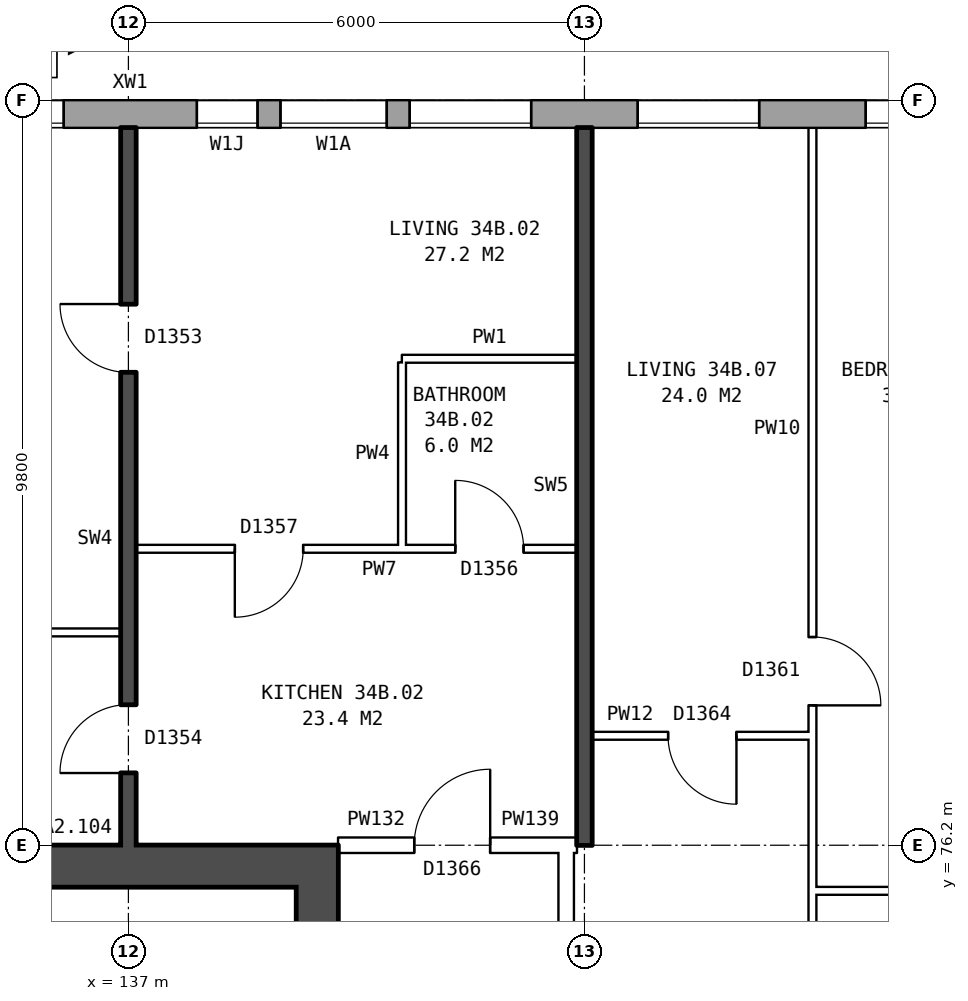
"""IFC4 building model, lengths in metres.
Left out: names, types, materials, properties, quantities, classifications, styles, units other than length and angle.
Written with IfcOpenShell. Run it as: python <this file> out.ifc"""

import sys

from ifc_helpers import new_model, si_unit, direction, frame, frame_2d, origin, place, context, subcontext, project, spatial, rectangle, extrude, element, fill, save


model = new_model("IFC4")
c1 = context("Model", 3, precision=1e-05, world=origin(), true_north=direction((0.0, 1.0)))
c2 = subcontext(c1, "Body", "Model", "MODEL_VIEW")
j1 = project(units=[si_unit("LENGTHUNIT", "METRE"), si_unit("PLANEANGLEUNIT", "RADIAN")], contexts=[c1])
p1 = place(None, origin())
s1 = spatial("IfcSite", under=j1, at=p1, CompositionType="ELEMENT")
p2 = place(p1, origin())
s2 = spatial("IfcBuilding", under=s1, at=p2, CompositionType="ELEMENT")
p3 = place(p2, frame((0.0, 0.0, 123.7)))
s3 = spatial("IfcBuildingStorey", under=s2, at=p3, CompositionType="ELEMENT", Elevation=123.7)
p4 = place(p3, frame((169.675, 85.82, 0.0), z_axis=(0.0, 0.0, 1.0), x_axis=(-1.0, 0.0, 0.0)))
e1 = element("IfcWall", 1, at=p4, inside=s3, PredefinedType="STANDARD", context=c2, shape_type="SweptSolid", body=[
    extrude(rectangle(XDim=35.601, YDim=0.36, at=frame_2d((17.8, 0.0))), origin(), (0.0, 0.0, 1.0), 2.85),
])
p5 = place(p4, frame((0.3, 0.0, 0.8)))
e2 = element("IfcOpeningElement", 2, at=p5, cuts=e1, PredefinedType="OPENING", context=c2, shape_type="SweptSolid", body=[
    extrude(rectangle(XDim=0.8, YDim=1.8, at=frame_2d((0.4, 0.9))), frame((0.0, 0.19, 0.0), z_axis=(0.0, -1.0, 0.0), x_axis=(1.0, 0.0, 0.0)), (0.0, 0.0, 1.0), 0.38),
])
p6 = place(p4, frame((3.125, 0.0, 0.8)))
e3 = element("IfcOpeningElement", 3, at=p6, cuts=e1, PredefinedType="OPENING", context=c2, shape_type="SweptSolid", body=[
    extrude(rectangle(XDim=0.8, YDim=0.9, at=frame_2d((0.4, 0.45))), frame((0.0, 0.19, 0.0), z_axis=(0.0, -1.0, 0.0), x_axis=(1.0, 0.0, 0.0)), (0.0, 0.0, 1.0), 0.38),
])
p7 = place(p4, frame((6.375, 0.0, 0.8)))
e4 = element("IfcOpeningElement", 4, at=p7, cuts=e1, PredefinedType="OPENING", context=c2, shape_type="SweptSolid", body=[
    extrude(rectangle(XDim=1.6, YDim=1.8, at=frame_2d((0.8, 0.9))), frame((0.0, 0.19, 0.0), z_axis=(0.0, -1.0, 0.0), x_axis=(1.0, 0.0, 0.0)), (0.0, 0.0, 1.0), 0.38),
])
p8 = place(p4, frame((9.375, 0.0, 0.8)))
e5 = element("IfcOpeningElement", 5, at=p8, cuts=e1, PredefinedType="OPENING", context=c2, shape_type="SweptSolid", body=[
    extrude(rectangle(XDim=1.6, YDim=1.8, at=frame_2d((0.8, 0.9))), frame((0.0, 0.19, 0.0), z_axis=(0.0, -1.0, 0.0), x_axis=(1.0, 0.0, 0.0)), (0.0, 0.0, 1.0), 0.38),
])
p9 = place(p4, frame((12.375, 0.0, 0.8)))
e6 = element("IfcOpeningElement", 6, at=p9, cuts=e1, PredefinedType="OPENING", context=c2, shape_type="SweptSolid", body=[
    extrude(rectangle(XDim=1.6, YDim=1.8, at=frame_2d((0.8, 0.9))), frame((0.0, 0.19, 0.0), z_axis=(0.0, -1.0, 0.0), x_axis=(1.0, 0.0, 0.0)), (0.0, 0.0, 1.0), 0.38),
])
p10 = place(p4, frame((15.375, 0.0, 0.8)))
e7 = element("IfcOpeningElement", 7, at=p10, cuts=e1, PredefinedType="OPENING", context=c2, shape_type="SweptSolid", body=[
    extrude(rectangle(XDim=1.6, YDim=1.8, at=frame_2d((0.8, 0.9))), frame((0.0, 0.19, 0.0), z_axis=(0.0, -1.0, 0.0), x_axis=(1.0, 0.0, 0.0)), (0.0, 0.0, 1.0), 0.38),
])
p11 = place(p4, frame((18.375, 0.0, 0.8)))
e8 = element("IfcOpeningElement", 8, at=p11, cuts=e1, PredefinedType="OPENING", context=c2, shape_type="SweptSolid", body=[
    extrude(rectangle(XDim=1.6, YDim=1.8, at=frame_2d((0.8, 0.9))), frame((0.0, 0.19, 0.0), z_axis=(0.0, -1.0, 0.0), x_axis=(1.0, 0.0, 0.0)), (0.0, 0.0, 1.0), 0.38),
])
p12 = place(p4, frame((21.375, 0.0, 0.8)))
e9 = element("IfcOpeningElement", 9, at=p12, cuts=e1, PredefinedType="OPENING", context=c2, shape_type="SweptSolid", body=[
    extrude(rectangle(XDim=1.6, YDim=1.8, at=frame_2d((0.8, 0.9))), frame((0.0, 0.19, 0.0), z_axis=(0.0, -1.0, 0.0), x_axis=(1.0, 0.0, 0.0)), (0.0, 0.0, 1.0), 0.38),
])
p13 = place(p4, frame((24.375, 0.0, 0.8)))
e10 = element("IfcOpeningElement", 10, at=p13, cuts=e1, PredefinedType="OPENING", context=c2, shape_type="SweptSolid", body=[
    extrude(rectangle(XDim=1.6, YDim=1.8, at=frame_2d((0.8, 0.9))), frame((0.0, 0.19, 0.0), z_axis=(0.0, -1.0, 0.0), x_axis=(1.0, 0.0, 0.0)), (0.0, 0.0, 1.0), 0.38),
])
p14 = place(p4, frame((27.375, 0.0, 0.8)))
e11 = element("IfcOpeningElement", 11, at=p14, cuts=e1, PredefinedType="OPENING", context=c2, shape_type="SweptSolid", body=[
    extrude(rectangle(XDim=1.6, YDim=1.8, at=frame_2d((0.8, 0.9))), frame((0.0, 0.19, 0.0), z_axis=(0.0, -1.0, 0.0), x_axis=(1.0, 0.0, 0.0)), (0.0, 0.0, 1.0), 0.38),
])
p15 = place(p4, frame((29.275, 0.0, 0.8)))
e12 = element("IfcOpeningElement", 12, at=p15, cuts=e1, PredefinedType="OPENING", context=c2, shape_type="SweptSolid", body=[
    extrude(rectangle(XDim=1.4, YDim=1.8, at=frame_2d((0.7, 0.9))), frame((0.0, 0.19, 0.0), z_axis=(0.0, -1.0, 0.0), x_axis=(1.0, 0.0, 0.0)), (0.0, 0.0, 1.0), 0.38),
])
p16 = place(p4, frame((33.525, 0.0, 1.7)))
e13 = element("IfcOpeningElement", 13, at=p16, cuts=e1, PredefinedType="OPENING", context=c2, shape_type="SweptSolid", body=[
    extrude(rectangle(XDim=0.6, YDim=0.9, at=frame_2d((0.3, 0.45))), frame((0.0, 0.19, 0.0), z_axis=(0.0, -1.0, 0.0), x_axis=(1.0, 0.0, 0.0)), (0.0, 0.0, 1.0), 0.38),
])
p17 = place(p4, frame((1.4, 0.0, 1.6)))
e14 = element("IfcOpeningElement", 14, at=p17, cuts=e1, PredefinedType="OPENING", context=c2, shape_type="SweptSolid", body=[
    extrude(rectangle(XDim=0.6, YDim=0.9, at=frame_2d((0.3, 0.45))), frame((0.0, 0.19, 0.0), z_axis=(0.0, -1.0, 0.0), x_axis=(1.0, 0.0, 0.0)), (0.0, 0.0, 1.0), 0.38),
])
p18 = place(p4, frame((4.225, 0.0, 0.8)))
e15 = element("IfcOpeningElement", 15, at=p18, cuts=e1, PredefinedType="OPENING", context=c2, shape_type="SweptSolid", body=[
    extrude(rectangle(XDim=1.6, YDim=1.8, at=frame_2d((0.8, 0.9))), frame((0.0, 0.19, 0.0), z_axis=(0.0, -1.0, 0.0), x_axis=(1.0, 0.0, 0.0)), (0.0, 0.0, 1.0), 0.38),
])
p19 = place(p4, frame((30.975, 0.0, 0.8)))
e16 = element("IfcOpeningElement", 16, at=p19, cuts=e1, PredefinedType="OPENING", context=c2, shape_type="SweptSolid", body=[
    extrude(rectangle(XDim=0.8, YDim=1.5, at=frame_2d((0.4, 0.75))), frame((0.0, 0.19, 0.0), z_axis=(0.0, -1.0, 0.0), x_axis=(1.0, 0.0, 0.0)), (0.0, 0.0, 1.0), 0.38),
])
p20 = place(p4, frame((34.425, 0.0, 0.8)))
e17 = element("IfcOpeningElement", 17, at=p20, cuts=e1, PredefinedType="OPENING", context=c2, shape_type="SweptSolid", body=[
    extrude(rectangle(XDim=0.8, YDim=1.8, at=frame_2d((0.4, 0.9))), frame((0.0, 0.19, 0.0), z_axis=(0.0, -1.0, 0.0), x_axis=(1.0, 0.0, 0.0)), (0.0, 0.0, 1.0), 0.38),
])
p21 = place(p3, frame((139.485, 63.8, 0.0), z_axis=(0.0, 0.0, 1.0), x_axis=(0.0, 1.0, 0.0)))
e18 = element("IfcWall", 18, at=p21, inside=s3, PredefinedType="SHEAR", context=c2, shape_type="SweptSolid", body=[
    extrude(rectangle(XDim=12.4, YDim=0.55, at=frame_2d((6.2, 0.0))), origin(), (0.0, 0.0, 1.0), 2.85),
])
p22 = place(p21, frame((1.325, 0.0, 0.0)))
e19 = element("IfcOpeningElement", 19, at=p22, cuts=e18, PredefinedType="OPENING", context=c2, shape_type="SweptSolid", body=[
    extrude(rectangle(XDim=1.1, YDim=2.1, at=frame_2d((0.55, 1.05))), frame((0.0, 0.285, 0.0), z_axis=(0.0, -1.0, 0.0), x_axis=(1.0, 0.0, 0.0)), (0.0, 0.0, 1.0), 0.57),
])
p23 = place(p21, frame((3.6, 0.0, 0.0)))
e20 = element("IfcOpeningElement", 20, at=p23, cuts=e18, PredefinedType="OPENING", context=c2, shape_type="SweptSolid", body=[
    extrude(rectangle(XDim=1.1, YDim=2.1, at=frame_2d((0.55, 1.05))), frame((0.0, 0.285, 0.0), z_axis=(0.0, -1.0, 0.0), x_axis=(1.0, 0.0, 0.0)), (0.0, 0.0, 1.0), 0.57),
])
p24 = place(p21, frame((5.8, 0.0, 0.0)))
e21 = element("IfcOpeningElement", 21, at=p24, cuts=e18, PredefinedType="OPENING", context=c2, shape_type="SweptSolid", body=[
    extrude(rectangle(XDim=1.1, YDim=2.1, at=frame_2d((0.55, 1.05))), frame((0.0, 0.285, 0.0), z_axis=(0.0, -1.0, 0.0), x_axis=(1.0, 0.0, 0.0)), (0.0, 0.0, 1.0), 0.57),
])
p25 = place(p21, frame((9.9, 0.0, 0.0)))
e22 = element("IfcOpeningElement", 22, at=p25, cuts=e18, PredefinedType="OPENING", context=c2, shape_type="SweptSolid", body=[
    extrude(rectangle(XDim=1.1, YDim=2.1, at=frame_2d((0.55, 1.05))), frame((0.0, 0.285, 0.0), z_axis=(0.0, -1.0, 0.0), x_axis=(1.0, 0.0, 0.0)), (0.0, 0.0, 1.0), 0.57),
])
p26 = place(p21, frame((8.125, 0.0, 0.0)))
e23 = element("IfcOpeningElement", 23, at=p26, cuts=e18, PredefinedType="OPENING", context=c2, shape_type="SweptSolid", body=[
    extrude(rectangle(XDim=0.85, YDim=2.1, at=frame_2d((0.425, 1.05))), frame((0.0, 0.285, 0.0), z_axis=(0.0, -1.0, 0.0), x_axis=(1.0, 0.0, 0.0)), (0.0, 0.0, 1.0), 0.57),
])
p27 = place(p3, frame((139.21, 75.925, 0.0), z_axis=(0.0, 0.0, 1.0), x_axis=(-1.0, 0.0, 0.0)))
e24 = element("IfcWall", 24, at=p27, inside=s3, PredefinedType="SHEAR", context=c2, shape_type="SweptSolid", body=[
    extrude(rectangle(XDim=7.3, YDim=0.55, at=frame_2d((3.65, 0.0))), origin(), (0.0, 0.0, 1.0), 2.85),
])
p28 = place(p3, frame((142.76, 63.9, 0.0), z_axis=(0.0, 0.0, 1.0), x_axis=(0.0, 1.0, 0.0)))
e25 = element("IfcWall", 25, at=p28, inside=s3, PredefinedType="PARTITIONING", context=c2, shape_type="SweptSolid", body=[
    extrude(rectangle(XDim=12.2, YDim=0.2, at=frame_2d((6.1, 0.0))), origin(), (0.0, 0.0, 1.0), 2.85),
])
p29 = place(p28, frame((5.1, 0.0, 0.0)))
e26 = element("IfcOpeningElement", 26, at=p29, cuts=e25, PredefinedType="OPENING", context=c2, shape_type="SweptSolid", body=[
    extrude(rectangle(XDim=2.0, YDim=2.1, at=frame_2d((1.0, 1.05))), frame((0.0, 0.11, 0.0), z_axis=(0.0, -1.0, 0.0), x_axis=(1.0, 0.0, 0.0)), (0.0, 0.0, 1.0), 0.22),
])
p30 = place(p3, frame((146.0, 75.6, 0.0), z_axis=(0.0, 0.0, 1.0), x_axis=(1.0, 0.0, 0.0)))
e27 = element("IfcWall", 27, at=p30, inside=s3, PredefinedType="PARTITIONING", context=c2, shape_type="SweptSolid", body=[
    extrude(rectangle(XDim=6.0, YDim=0.1, at=frame_2d((3.0, 0.0))), origin(), (0.0, 0.0, 1.0), 2.85),
])
p31 = place(p3, frame((139.76, 76.2, 0.0), z_axis=(0.0, 0.0, 1.0), x_axis=(1.0, 0.0, 0.0)))
e28 = element("IfcWall", 28, at=p31, inside=s3, PredefinedType="PARTITIONING", context=c2, shape_type="SweptSolid", body=[
    extrude(rectangle(XDim=3.0, YDim=0.2, at=frame_2d((1.5, 0.0))), origin(), (0.0, 0.0, 1.0), 2.85),
])
p32 = place(p31, frame((1.0, 0.0, 0.0)))
e29 = element("IfcOpeningElement", 29, at=p32, cuts=e28, PredefinedType="OPENING", context=c2, shape_type="SweptSolid", body=[
    extrude(rectangle(XDim=1.0, YDim=2.1, at=frame_2d((0.5, 1.05))), frame((0.0, 0.11, 0.0), z_axis=(0.0, -1.0, 0.0), x_axis=(1.0, 0.0, 0.0)), (0.0, 0.0, 1.0), 0.22),
])
p33 = place(p3, frame((142.76, 76.2, 0.0), z_axis=(0.0, 0.0, 1.0), x_axis=(1.0, 0.0, 0.0)))
e30 = element("IfcWall", 30, at=p33, inside=s3, PredefinedType="PARTITIONING", context=c2, shape_type="SweptSolid", body=[
    extrude(rectangle(XDim=0.14, YDim=0.2, at=frame_2d((0.07, 0.0))), origin(), (0.0, 0.0, 1.0), 2.85),
])
p34 = place(p3, frame((143.1, 77.64, 0.0), z_axis=(0.0, 0.0, 1.0), x_axis=(1.0, 0.0, 0.0)))
e31 = element("IfcWall", 31, at=p34, inside=s3, PredefinedType="PARTITIONING", context=c2, shape_type="SweptSolid", body=[
    extrude(rectangle(XDim=2.9, YDim=0.1, at=frame_2d((1.45, 0.0))), origin(), (0.0, 0.0, 1.0), 2.85),
])
p35 = place(p34, frame((1.0, 0.0, 0.0)))
e32 = element("IfcOpeningElement", 32, at=p35, cuts=e31, PredefinedType="OPENING", context=c2, shape_type="SweptSolid", body=[
    extrude(rectangle(XDim=0.9, YDim=2.1, at=frame_2d((0.45, 1.05))), frame((0.0, 0.06, 0.0), z_axis=(0.0, -1.0, 0.0), x_axis=(1.0, 0.0, 0.0)), (0.0, 0.0, 1.0), 0.12),
])
p36 = place(p3, frame((131.36, 79.0, 0.0), z_axis=(0.0, 0.0, 1.0), x_axis=(1.0, 0.0, 0.0)))
e33 = element("IfcWall", 33, at=p36, inside=s3, PredefinedType="PARTITIONING", context=c2, shape_type="SweptSolid", body=[
    extrude(rectangle(XDim=5.54, YDim=0.1, at=frame_2d((2.77, 0.0))), origin(), (0.0, 0.0, 1.0), 2.85),
])
p37 = place(p3, frame((137.1, 80.1, 0.0), z_axis=(0.0, 0.0, 1.0), x_axis=(1.0, 0.0, 0.0)))
e34 = element("IfcWall", 34, at=p37, inside=s3, PredefinedType="PARTITIONING", context=c2, shape_type="SweptSolid", body=[
    extrude(rectangle(XDim=5.8, YDim=0.1, at=frame_2d((2.9, 0.0))), origin(), (0.0, 0.0, 1.0), 2.85),
])
p38 = place(p37, frame((1.3, 0.0, 0.0)))
e35 = element("IfcOpeningElement", 35, at=p38, cuts=e34, PredefinedType="OPENING", context=c2, shape_type="SweptSolid", body=[
    extrude(rectangle(XDim=0.9, YDim=2.1, at=frame_2d((0.45, 1.05))), frame((0.0, 0.06, 0.0), z_axis=(0.0, -1.0, 0.0), x_axis=(1.0, 0.0, 0.0)), (0.0, 0.0, 1.0), 0.12),
])
p39 = place(p37, frame((4.2, 0.0, 0.0)))
e36 = element("IfcOpeningElement", 36, at=p39, cuts=e34, PredefinedType="OPENING", context=c2, shape_type="SweptSolid", body=[
    extrude(rectangle(XDim=0.9, YDim=2.1, at=frame_2d((0.45, 1.05))), frame((0.0, 0.06, 0.0), z_axis=(0.0, -1.0, 0.0), x_axis=(1.0, 0.0, 0.0)), (0.0, 0.0, 1.0), 0.12),
])
p40 = place(p3, frame((140.6, 82.6, 0.0), z_axis=(0.0, 0.0, 1.0), x_axis=(1.0, 0.0, 0.0)))
e37 = element("IfcWall", 37, at=p40, inside=s3, PredefinedType="PARTITIONING", context=c2, shape_type="SweptSolid", body=[
    extrude(rectangle(XDim=2.3, YDim=0.1, at=frame_2d((1.15, 0.0))), origin(), (0.0, 0.0, 1.0), 2.85),
])
p41 = place(p3, frame((137.0, 76.2, 0.0), z_axis=(0.0, 0.0, 1.0), x_axis=(0.0, 1.0, 0.0)))
e38 = element("IfcWall", 38, at=p41, inside=s3, PredefinedType="SOLIDWALL", context=c2, shape_type="SweptSolid", body=[
    extrude(rectangle(XDim=9.44, YDim=0.2, at=frame_2d((4.72, 0.0))), origin(), (0.0, 0.0, 1.0), 2.85),
])
p42 = place(p41, frame((6.22, 0.0, 0.0)))
e39 = element("IfcOpeningElement", 39, at=p42, cuts=e38, PredefinedType="OPENING", context=c2, shape_type="SweptSolid", body=[
    extrude(rectangle(XDim=0.9, YDim=2.1, at=frame_2d((0.45, 1.05))), frame((0.0, 0.11, 0.0), z_axis=(0.0, -1.0, 0.0), x_axis=(1.0, 0.0, 0.0)), (0.0, 0.0, 1.0), 0.22),
])
p43 = place(p41, frame((0.95, 0.0, 0.0)))
e40 = element("IfcOpeningElement", 40, at=p43, cuts=e38, PredefinedType="OPENING", context=c2, shape_type="SweptSolid", body=[
    extrude(rectangle(XDim=0.9, YDim=2.1, at=frame_2d((0.45, 1.05))), frame((0.0, 0.11, 0.0), z_axis=(0.0, -1.0, 0.0), x_axis=(1.0, 0.0, 0.0)), (0.0, 0.0, 1.0), 0.22),
])
p44 = place(p3, frame((140.6, 80.15, 0.0), z_axis=(0.0, 0.0, 1.0), x_axis=(0.0, 1.0, 0.0)))
e41 = element("IfcWall", 41, at=p44, inside=s3, PredefinedType="PARTITIONING", context=c2, shape_type="SweptSolid", body=[
    extrude(rectangle(XDim=2.4, YDim=0.1, at=frame_2d((1.2, 0.0))), origin(), (0.0, 0.0, 1.0), 2.85),
])
p45 = place(p3, frame((143.0, 76.2, 0.0), z_axis=(0.0, 0.0, 1.0), x_axis=(0.0, 1.0, 0.0)))
e42 = element("IfcWall", 42, at=p45, inside=s3, PredefinedType="SOLIDWALL", context=c2, shape_type="SweptSolid", body=[
    extrude(rectangle(XDim=9.44, YDim=0.2, at=frame_2d((4.72, 0.0))), origin(), (0.0, 0.0, 1.0), 2.85),
])
p46 = place(p3, frame((146.0, 71.3, 0.0), z_axis=(0.0, 0.0, 1.0), x_axis=(0.0, 1.0, 0.0)))
e43 = element("IfcWall", 43, at=p46, inside=s3, PredefinedType="PARTITIONING", context=c2, shape_type="SweptSolid", body=[
    extrude(rectangle(XDim=14.34, YDim=0.1, at=frame_2d((7.17, 0.0))), origin(), (0.0, 0.0, 1.0), 2.85),
])
p47 = place(p46, frame((6.74, 0.0, 0.0)))
e44 = element("IfcOpeningElement", 44, at=p47, cuts=e43, PredefinedType="OPENING", context=c2, shape_type="SweptSolid", body=[
    extrude(rectangle(XDim=0.9, YDim=2.1, at=frame_2d((0.45, 1.05))), frame((0.0, 0.06, 0.0), z_axis=(0.0, -1.0, 0.0), x_axis=(1.0, 0.0, 0.0)), (0.0, 0.0, 1.0), 0.12),
])
p48 = place(p46, frame((0.4, 0.0, 0.0)))
e45 = element("IfcOpeningElement", 45, at=p48, cuts=e43, PredefinedType="OPENING", context=c2, shape_type="SweptSolid", body=[
    extrude(rectangle(XDim=0.9, YDim=2.1, at=frame_2d((0.45, 1.05))), frame((0.0, 0.06, 0.0), z_axis=(0.0, -1.0, 0.0), x_axis=(1.0, 0.0, 0.0)), (0.0, 0.0, 1.0), 0.12),
])
p49 = place(p12, origin())
e46 = element("IfcWindow", 46, at=p49, inside=s3, PartitioningType="SINGLE_PANEL", PredefinedType="WINDOW", context=c2, shape_type="SweptSolid", body=[
    extrude(rectangle(XDim=1.6, YDim=1.8, at=frame_2d((0.8, 0.9))), frame((0.0, 0.15, 0.0), z_axis=(0.0, -1.0, 0.0), x_axis=(1.0, 0.0, 0.0)), (0.0, 0.0, 1.0), 0.06),
])
fill(e9, e46)
p50 = place(p13, origin())
e47 = element("IfcWindow", 47, at=p50, inside=s3, PartitioningType="SINGLE_PANEL", PredefinedType="WINDOW", context=c2, shape_type="SweptSolid", body=[
    extrude(rectangle(XDim=1.6, YDim=1.8, at=frame_2d((0.8, 0.9))), frame((0.0, 0.15, 0.0), z_axis=(0.0, -1.0, 0.0), x_axis=(1.0, 0.0, 0.0)), (0.0, 0.0, 1.0), 0.06),
])
fill(e10, e47)
p51 = place(p14, origin())
e48 = element("IfcWindow", 48, at=p51, inside=s3, PartitioningType="SINGLE_PANEL", PredefinedType="WINDOW", context=c2, shape_type="SweptSolid", body=[
    extrude(rectangle(XDim=1.6, YDim=1.8, at=frame_2d((0.8, 0.9))), frame((0.0, 0.15, 0.0), z_axis=(0.0, -1.0, 0.0), x_axis=(1.0, 0.0, 0.0)), (0.0, 0.0, 1.0), 0.06),
])
fill(e11, e48)
p52 = place(p15, origin())
e49 = element("IfcWindow", 49, at=p52, inside=s3, PartitioningType="SINGLE_PANEL", PredefinedType="WINDOW", context=c2, shape_type="SweptSolid", body=[
    extrude(rectangle(XDim=1.4, YDim=1.8, at=frame_2d((0.7, 0.9))), frame((0.0, 0.15, 0.0), z_axis=(0.0, -1.0, 0.0), x_axis=(1.0, 0.0, 0.0)), (0.0, 0.0, 1.0), 0.06),
])
fill(e12, e49)
p53 = place(p16, origin())
e50 = element("IfcWindow", 50, at=p53, inside=s3, PartitioningType="SINGLE_PANEL", PredefinedType="WINDOW", context=c2, shape_type="SweptSolid", body=[
    extrude(rectangle(XDim=0.6, YDim=0.9, at=frame_2d((0.3, 0.45))), frame((0.0, 0.15, 0.0), z_axis=(0.0, -1.0, 0.0), x_axis=(1.0, 0.0, 0.0)), (0.0, 0.0, 1.0), 0.06),
])
fill(e13, e50)
p54 = place(p42, origin())
e51 = element("IfcDoor", 51, at=p54, inside=s3, OperationType="SINGLE_SWING_RIGHT", PredefinedType="DOOR", context=c2, shape_type="SweptSolid", body=[
    extrude(rectangle(XDim=0.9, YDim=2.1, at=frame_2d((0.45, 1.05))), frame((0.0, 0.025, 0.0), z_axis=(0.0, -1.0, 0.0), x_axis=(1.0, 0.0, 0.0)), (0.0, 0.0, 1.0), 0.05),
])
fill(e39, e51)
p55 = place(p43, origin())
e52 = element("IfcDoor", 52, at=p55, inside=s3, OperationType="SINGLE_SWING_LEFT", PredefinedType="DOOR", context=c2, shape_type="SweptSolid", body=[
    extrude(rectangle(XDim=0.9, YDim=2.1, at=frame_2d((0.45, 1.05))), frame((0.0, 0.025, 0.0), z_axis=(0.0, -1.0, 0.0), x_axis=(1.0, 0.0, 0.0)), (0.0, 0.0, 1.0), 0.05),
])
fill(e40, e52)
p56 = place(p32, origin())
e53 = element("IfcDoor", 53, at=p56, inside=s3, OperationType="SINGLE_SWING_RIGHT", PredefinedType="DOOR", context=c2, shape_type="SweptSolid", body=[
    extrude(rectangle(XDim=1.0, YDim=2.1, at=frame_2d((0.5, 1.05))), frame((0.0, 0.025, 0.0), z_axis=(0.0, -1.0, 0.0), x_axis=(1.0, 0.0, 0.0)), (0.0, 0.0, 1.0), 0.05),
])
fill(e29, e53)
p57 = place(p38, frame((0.9, 0.0, 0.0), z_axis=(0.0, 0.0, 1.0), x_axis=(-1.0, 0.0, 0.0)))
e54 = element("IfcDoor", 54, at=p57, inside=s3, OperationType="SINGLE_SWING_RIGHT", PredefinedType="DOOR", context=c2, shape_type="SweptSolid", body=[
    extrude(rectangle(XDim=0.9, YDim=2.1, at=frame_2d((0.45, 1.05))), frame((0.0, 0.025, 0.0), z_axis=(0.0, -1.0, 0.0), x_axis=(1.0, 0.0, 0.0)), (0.0, 0.0, 1.0), 0.05),
])
fill(e35, e54)
p58 = place(p39, origin())
e55 = element("IfcDoor", 55, at=p58, inside=s3, OperationType="SINGLE_SWING_LEFT", PredefinedType="DOOR", context=c2, shape_type="SweptSolid", body=[
    extrude(rectangle(XDim=0.9, YDim=2.1, at=frame_2d((0.45, 1.05))), frame((0.0, 0.025, 0.0), z_axis=(0.0, -1.0, 0.0), x_axis=(1.0, 0.0, 0.0)), (0.0, 0.0, 1.0), 0.05),
])
fill(e36, e55)
p59 = place(p47, frame((0.9, 0.0, 0.0), z_axis=(0.0, 0.0, 1.0), x_axis=(-1.0, 0.0, 0.0)))
e56 = element("IfcDoor", 56, at=p59, inside=s3, OperationType="SINGLE_SWING_RIGHT", PredefinedType="DOOR", context=c2, shape_type="SweptSolid", body=[
    extrude(rectangle(XDim=0.9, YDim=2.1, at=frame_2d((0.45, 1.05))), frame((0.0, 0.025, 0.0), z_axis=(0.0, -1.0, 0.0), x_axis=(1.0, 0.0, 0.0)), (0.0, 0.0, 1.0), 0.05),
])
fill(e44, e56)
p60 = place(p35, frame((0.9, 0.0, 0.0), z_axis=(0.0, 0.0, 1.0), x_axis=(-1.0, 0.0, 0.0)))
e57 = element("IfcDoor", 57, at=p60, inside=s3, OperationType="SINGLE_SWING_LEFT", PredefinedType="DOOR", context=c2, shape_type="SweptSolid", body=[
    extrude(rectangle(XDim=0.9, YDim=2.1, at=frame_2d((0.45, 1.05))), frame((0.0, 0.025, 0.0), z_axis=(0.0, -1.0, 0.0), x_axis=(1.0, 0.0, 0.0)), (0.0, 0.0, 1.0), 0.05),
])
fill(e32, e57)
p61 = place(p19, origin())
e58 = element("IfcWindow", 58, at=p61, inside=s3, PartitioningType="SINGLE_PANEL", PredefinedType="WINDOW", context=c2, shape_type="SweptSolid", body=[
    extrude(rectangle(XDim=0.8, YDim=1.5, at=frame_2d((0.4, 0.75))), frame((0.0, 0.15, 0.0), z_axis=(0.0, -1.0, 0.0), x_axis=(1.0, 0.0, 0.0)), (0.0, 0.0, 1.0), 0.06),
])
fill(e16, e58)
save(model, sys.argv[1])
